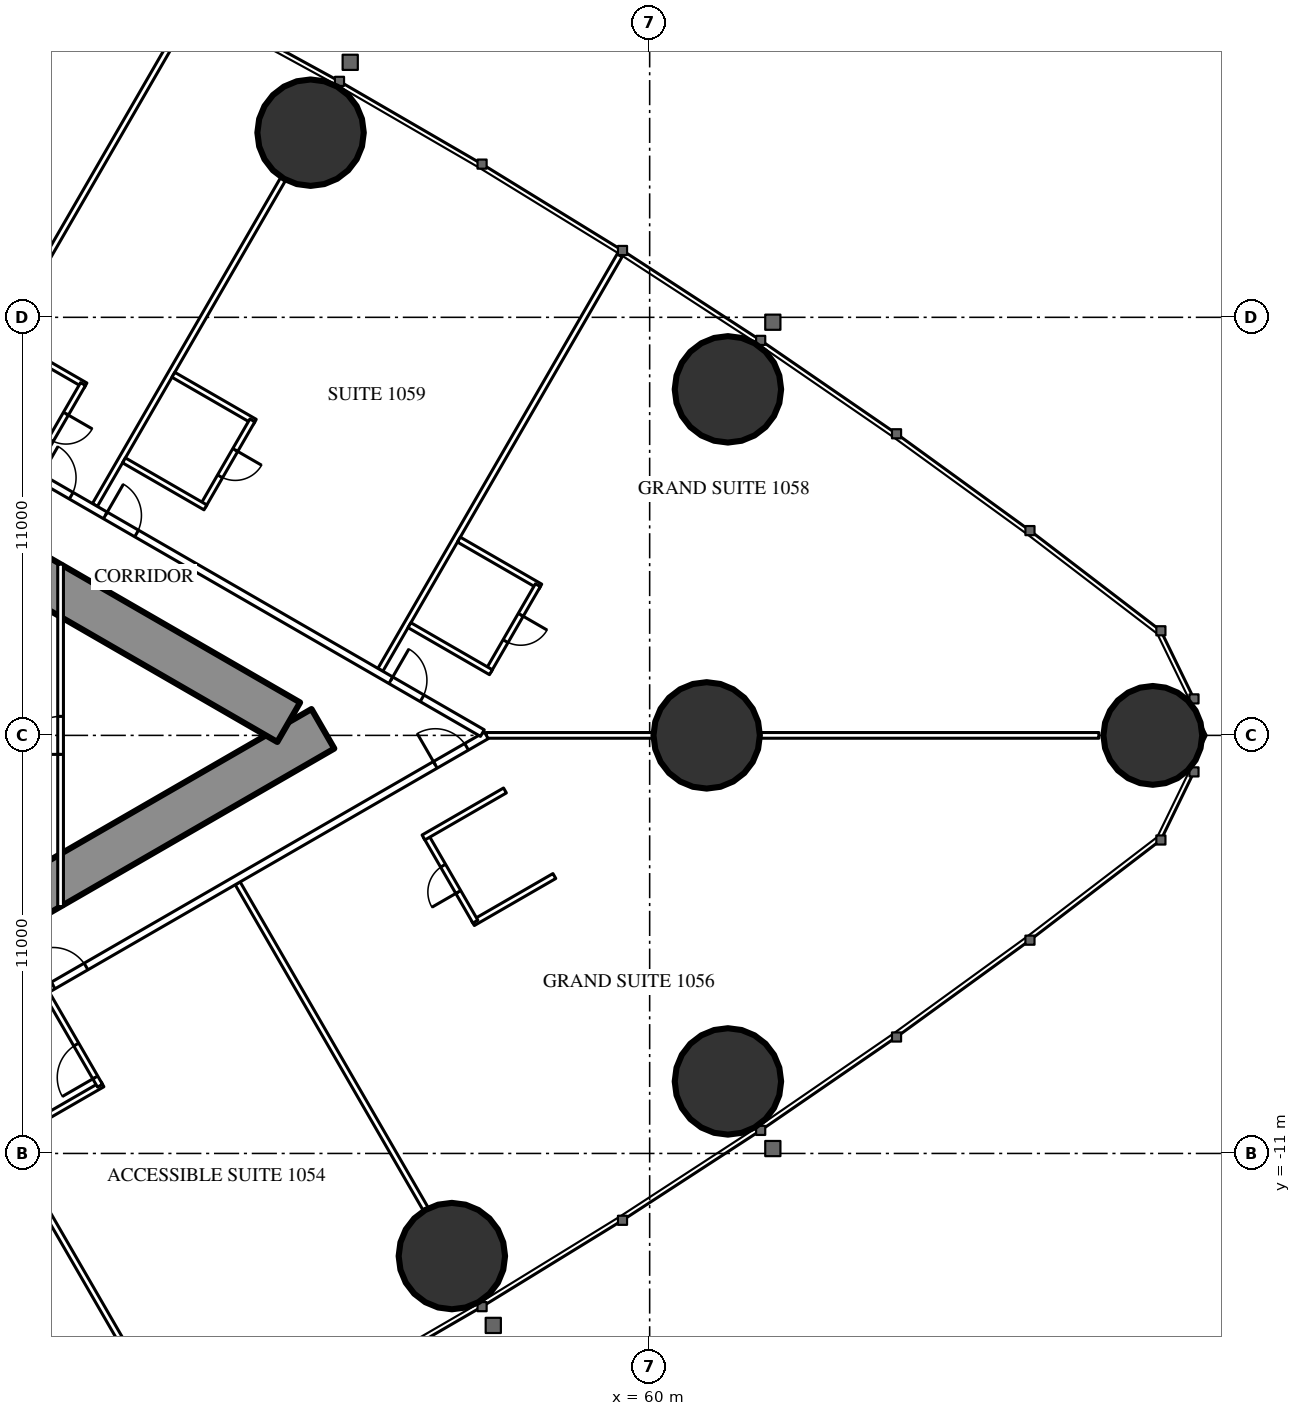
"""IFC4 building model, lengths in metres.
Left out: names, types, materials, properties, quantities, classifications, styles, units other than length and angle.
Written with IfcOpenShell. Run it as: python <this file> out.ifc"""

import sys

from ifc_helpers import new_model, si_unit, direction, frame, frame_2d, origin, origin_2d, place, context, subcontext, project, spatial, rectangle, hollow_circle, extrude, element, fill, save


model = new_model("IFC4")
c1 = context("Model", 3, precision=1e-05, world=origin(), true_north=direction((0.0, 1.0)))
c2 = subcontext(c1, "Body", "Model", "MODEL_VIEW")
j1 = project(units=[si_unit("LENGTHUNIT", "METRE"), si_unit("PLANEANGLEUNIT", "RADIAN")], contexts=[c1])
p1 = place(None, origin())
s1 = spatial("IfcSite", under=j1, at=p1, CompositionType="ELEMENT")
p2 = place(p1, origin())
s2 = spatial("IfcBuilding", under=s1, at=p2, CompositionType="ELEMENT")
p3 = place(p2, frame((0.0, 0.0, 42.5)))
s3 = spatial("IfcBuildingStorey", under=s2, at=p3, CompositionType="ELEMENT", Elevation=42.5)
p4 = place(p3, frame((73.239, 0.0, 0.0), z_axis=(0.0, 0.0, 1.0), x_axis=(1.0, 0.0, 0.0)))
e1 = element("IfcColumn", 1, at=p4, inside=s3, PredefinedType="COLUMN", context=c2, shape_type="SweptSolid", body=[
    extrude(hollow_circle(Radius=1.3, WallThickness=0.1, at=origin_2d()), origin(), (0.0, 0.0, 1.0), 3.5),
])
for number, where, z_axis, x_axis in (
    (2, (62.059, 9.105, 0.0), (0.0, 0.0, 1.0), (1.0, 0.0, 0.0)),
    (3, (51.078, 15.858, 0.0), (0.0, 0.0, 1.0), (1.0, 0.0, 0.0)),
    (4, (54.795, -13.701, 0.0), (0.0, 0.0, 1.0), (1.0, 0.0, 0.0)),
    (5, (62.059, -9.105, 0.0), (0.0, 0.0, 1.0), (1.0, 0.0, 0.0)),
):
    element("IfcColumn", number, at=place(p3, frame(where, z_axis=z_axis, x_axis=x_axis)), inside=s3, PredefinedType="COLUMN", context=c2, shape_type="SweptSolid", body=[
        extrude(hollow_circle(Radius=1.4, WallThickness=0.12, at=origin_2d()), origin(), (0.0, 0.0, 1.0), 3.5),
    ])
p5 = place(p3, frame((61.5, 0.0, 0.0), z_axis=(0.0, 0.0, 1.0), x_axis=(1.0, 0.0, 0.0)))
e6 = element("IfcColumn", 6, at=p5, inside=s3, PredefinedType="COLUMN", context=c2, shape_type="SweptSolid", body=[
    extrude(hollow_circle(Radius=1.4, WallThickness=0.1, at=origin_2d()), origin(), (0.0, 0.0, 1.0), 3.5),
])
p6 = place(p3, frame((27.2, -13.8, 0.0), z_axis=(0.0, 0.0, 1.0), x_axis=(0.866027159892, 0.499996958321, 0.0)))
e7 = element("IfcWall", 7, at=p6, inside=s3, PredefinedType="SHEAR", context=c2, shape_type="SweptSolid", body=[
    extrude(rectangle(XDim=27.947, YDim=1.2, at=frame_2d((13.973, 0.0))), origin(), (0.0, 0.0, 1.0), 3.5),
])
p7 = place(p6, frame((4.6, 0.0, 0.0)))
e8 = element("IfcOpeningElement", 8, at=p7, cuts=e7, PredefinedType="OPENING", context=c2, shape_type="SweptSolid", body=[
    extrude(rectangle(XDim=1.0, YDim=2.2, at=frame_2d((0.5, 1.1))), frame((0.0, 0.61, 0.0), z_axis=(0.0, -1.0, 0.0), x_axis=(1.0, 0.0, 0.0)), (0.0, 0.0, 1.0), 1.22),
])
p8 = place(p6, frame((13.395, 0.0, 0.0)))
e9 = element("IfcOpeningElement", 9, at=p8, cuts=e7, PredefinedType="OPENING", context=c2, shape_type="SweptSolid", body=[
    extrude(rectangle(XDim=1.8, YDim=2.2, at=frame_2d((0.9, 1.1))), frame((0.0, 0.61, 0.0), z_axis=(0.0, -1.0, 0.0), x_axis=(1.0, 0.0, 0.0)), (0.0, 0.0, 1.0), 1.22),
])
p9 = place(p3, frame((27.2, 13.8, 0.0), z_axis=(0.0, 0.0, 1.0), x_axis=(0.866024515034, -0.500001539357, 0.0)))
e10 = element("IfcWall", 10, at=p9, inside=s3, PredefinedType="SHEAR", context=c2, shape_type="SweptSolid", body=[
    extrude(rectangle(XDim=26.907, YDim=1.2, at=frame_2d((13.454, 0.0))), origin(), (0.0, 0.0, 1.0), 3.5),
])
p10 = place(p9, frame((4.6, 0.0, 0.0)))
e11 = element("IfcOpeningElement", 11, at=p10, cuts=e10, PredefinedType="OPENING", context=c2, shape_type="SweptSolid", body=[
    extrude(rectangle(XDim=1.0, YDim=2.2, at=frame_2d((0.5, 1.1))), frame((0.0, 0.61, 0.0), z_axis=(0.0, -1.0, 0.0), x_axis=(1.0, 0.0, 0.0)), (0.0, 0.0, 1.0), 1.22),
])
p11 = place(p9, frame((13.395, 0.0, 0.0)))
e12 = element("IfcOpeningElement", 12, at=p11, cuts=e10, PredefinedType="OPENING", context=c2, shape_type="SweptSolid", body=[
    extrude(rectangle(XDim=1.8, YDim=2.2, at=frame_2d((0.9, 1.1))), frame((0.0, 0.61, 0.0), z_axis=(0.0, -1.0, 0.0), x_axis=(1.0, 0.0, 0.0)), (0.0, 0.0, 1.0), 1.22),
])
p12 = place(p3, frame((41.647, -8.23, 0.0), z_axis=(0.0, 0.0, 1.0), x_axis=(0.49998590462, -0.866033541603, 0.0)))
e13 = element("IfcWall", 13, at=p12, inside=s3, PredefinedType="PARTITIONING", context=c2, shape_type="SweptSolid", body=[
    extrude(rectangle(XDim=12.621, YDim=0.15, at=frame_2d((6.311, 0.0))), origin(), (0.0, 0.0, 1.0), 3.25),
])
p13 = place(p3, frame((49.159, -3.893, 0.0), z_axis=(0.0, 0.0, 1.0), x_axis=(0.499998773722, -0.866026111775, 0.0)))
e14 = element("IfcWall", 14, at=p13, inside=s3, PredefinedType="PARTITIONING", context=c2, shape_type="SweptSolid", body=[
    extrude(rectangle(XDim=9.892, YDim=0.15, at=frame_2d((4.946, 0.0))), origin(), (0.0, 0.0, 1.0), 2.25),
])
p14 = place(p3, frame((41.647, 8.23, 0.0), z_axis=(0.0, 0.0, 1.0), x_axis=(0.49998590462, 0.866033541603, 0.0)))
e15 = element("IfcWall", 15, at=p14, inside=s3, PredefinedType="PARTITIONING", context=c2, shape_type="SweptSolid", body=[
    extrude(rectangle(XDim=12.621, YDim=0.15, at=frame_2d((6.311, 0.0))), origin(), (0.0, 0.0, 1.0), 3.25),
])
p15 = place(p3, frame((45.403, 6.062, 0.0), z_axis=(0.0, 0.0, 1.0), x_axis=(0.500013434677, 0.866017647131, 0.0)))
e16 = element("IfcWall", 16, at=p15, inside=s3, PredefinedType="PARTITIONING", context=c2, shape_type="SweptSolid", body=[
    extrude(rectangle(XDim=9.902, YDim=0.15, at=frame_2d((4.951, 0.0))), origin(), (0.0, 0.0, 1.0), 2.25),
])
p16 = place(p3, frame((52.915, 1.725, 0.0), z_axis=(0.0, 0.0, 1.0), x_axis=(0.499997163113, 0.866027041656, 0.0)))
e17 = element("IfcWall", 17, at=p16, inside=s3, PredefinedType="PARTITIONING", context=c2, shape_type="SweptSolid", body=[
    extrude(rectangle(XDim=12.591, YDim=0.15, at=frame_2d((6.295, 0.0))), origin(), (0.0, 0.0, 1.0), 3.25),
])
p17 = place(p3, frame((55.702, 0.0, 0.0), z_axis=(0.0, 0.0, 1.0), x_axis=(1.0, 0.0, 0.0)))
e18 = element("IfcWall", 18, at=p17, inside=s3, PredefinedType="PARTITIONING", context=c2, shape_type="SweptSolid", body=[
    extrude(rectangle(XDim=16.117, YDim=0.15, at=frame_2d((8.059, 0.0))), origin(), (0.0, 0.0, 1.0), 2.25),
])
p18 = place(p3, frame((37.96, -10.243, 0.0), z_axis=(0.0, 0.0, 1.0), x_axis=(0.866026429433, 0.499998223521, 0.0)))
e19 = element("IfcWall", 19, at=p18, inside=s3, PredefinedType="PARTITIONING", context=c2, shape_type="SweptSolid", body=[
    extrude(rectangle(XDim=20.487, YDim=0.2, at=frame_2d((10.243, 0.0))), origin(), (0.0, 0.0, 1.0), 3.25),
])
p19 = place(p18, frame((7.325, 0.0, 0.0)))
e20 = element("IfcOpeningElement", 20, at=p19, cuts=e19, PredefinedType="OPENING", context=c2, shape_type="SweptSolid", body=[
    extrude(rectangle(XDim=1.0, YDim=2.2, at=frame_2d((0.5, 1.1))), frame((0.0, 0.11, 0.0), z_axis=(0.0, -1.0, 0.0), x_axis=(1.0, 0.0, 0.0)), (0.0, 0.0, 1.0), 0.22),
])
p20 = place(p18, frame((18.937, 0.0, 0.0)))
e21 = element("IfcOpeningElement", 21, at=p20, cuts=e19, PredefinedType="OPENING", context=c2, shape_type="SweptSolid", body=[
    extrude(rectangle(XDim=0.95, YDim=2.2, at=frame_2d((0.475, 1.1))), frame((0.0, 0.11, 0.0), z_axis=(0.0, -1.0, 0.0), x_axis=(1.0, 0.0, 0.0)), (0.0, 0.0, 1.0), 0.22),
])
p21 = place(p18, frame((0.6, 0.0, 0.0)))
e22 = element("IfcOpeningElement", 22, at=p21, cuts=e19, PredefinedType="OPENING", context=c2, shape_type="SweptSolid", body=[
    extrude(rectangle(XDim=0.95, YDim=2.2, at=frame_2d((0.475, 1.1))), frame((0.0, 0.11, 0.0), z_axis=(0.0, -1.0, 0.0), x_axis=(1.0, 0.0, 0.0)), (0.0, 0.0, 1.0), 0.22),
])
p22 = place(p3, frame((36.834, 10.894, 0.0), z_axis=(0.0, 0.0, 1.0), x_axis=(0.866028157229, -0.499995230863, 0.0)))
e23 = element("IfcWall", 23, at=p22, inside=s3, PredefinedType="PARTITIONING", context=c2, shape_type="SweptSolid", body=[
    extrude(rectangle(XDim=21.667, YDim=0.2, at=frame_2d((10.833, 0.0))), origin(), (0.0, 0.0, 1.0), 3.25),
])
p23 = place(p22, frame((18.885, 0.0, 0.0)))
e24 = element("IfcOpeningElement", 24, at=p23, cuts=e23, PredefinedType="OPENING", context=c2, shape_type="SweptSolid", body=[
    extrude(rectangle(XDim=0.95, YDim=2.2, at=frame_2d((0.475, 1.1))), frame((0.0, 0.11, 0.0), z_axis=(0.0, -1.0, 0.0), x_axis=(1.0, 0.0, 0.0)), (0.0, 0.0, 1.0), 0.22),
])
p24 = place(p22, frame((10.212, 0.0, 0.0)))
e25 = element("IfcOpeningElement", 25, at=p24, cuts=e23, PredefinedType="OPENING", context=c2, shape_type="SweptSolid", body=[
    extrude(rectangle(XDim=0.95, YDim=2.2, at=frame_2d((0.475, 1.1))), frame((0.0, 0.11, 0.0), z_axis=(0.0, -1.0, 0.0), x_axis=(1.0, 0.0, 0.0)), (0.0, 0.0, 1.0), 0.22),
])
p25 = place(p22, frame((8.225, 0.0, 0.0)))
e26 = element("IfcOpeningElement", 26, at=p25, cuts=e23, PredefinedType="OPENING", context=c2, shape_type="SweptSolid", body=[
    extrude(rectangle(XDim=0.95, YDim=2.2, at=frame_2d((0.475, 1.1))), frame((0.0, 0.11, 0.0), z_axis=(0.0, -1.0, 0.0), x_axis=(1.0, 0.0, 0.0)), (0.0, 0.0, 1.0), 0.22),
])
p26 = place(p22, frame((1.825, 0.0, 0.0)))
e27 = element("IfcOpeningElement", 27, at=p26, cuts=e23, PredefinedType="OPENING", context=c2, shape_type="SweptSolid", body=[
    extrude(rectangle(XDim=0.95, YDim=2.2, at=frame_2d((0.475, 1.1))), frame((0.0, 0.11, 0.0), z_axis=(0.0, -1.0, 0.0), x_axis=(1.0, 0.0, 0.0)), (0.0, 0.0, 1.0), 0.22),
])
p27 = place(p22, frame((0.246, 0.0, 0.0)))
e28 = element("IfcOpeningElement", 28, at=p27, cuts=e23, PredefinedType="OPENING", context=c2, shape_type="SweptSolid", body=[
    extrude(rectangle(XDim=0.9, YDim=2.2, at=frame_2d((0.45, 1.1))), frame((0.0, 0.11, 0.0), z_axis=(0.0, -1.0, 0.0), x_axis=(1.0, 0.0, 0.0)), (0.0, 0.0, 1.0), 0.22),
])
p28 = place(p3, frame((43.112, -10.617, 0.0), z_axis=(0.0, 0.0, 1.0), x_axis=(0.866018712932, 0.500011588718, 0.0)))
e29 = element("IfcWall", 29, at=p28, inside=s3, PredefinedType="PARTITIONING", context=c2, shape_type="SweptSolid", body=[
    extrude(rectangle(XDim=2.875, YDim=0.15, at=frame_2d((1.438, 0.0))), origin(), (0.0, 0.0, 1.0), 3.25),
])
p29 = place(p3, frame((44.137, -6.792, 0.0), z_axis=(0.0, 0.0, 1.0), x_axis=(0.49994636267, -0.866056369097, 0.0)))
e30 = element("IfcWall", 30, at=p29, inside=s3, PredefinedType="PARTITIONING", context=c2, shape_type="SweptSolid", body=[
    extrude(rectangle(XDim=2.8, YDim=0.15, at=frame_2d((1.4, 0.0))), origin(), (0.0, 0.0, 1.0), 3.25),
])
p30 = place(p29, frame((1.55, 0.0, 0.0)))
e31 = element("IfcOpeningElement", 31, at=p30, cuts=e30, PredefinedType="OPENING", context=c2, shape_type="SweptSolid", body=[
    extrude(rectangle(XDim=1.0, YDim=2.2, at=frame_2d((0.5, 1.1))), frame((0.0, 0.085, 0.0), z_axis=(0.0, -1.0, 0.0), x_axis=(1.0, 0.0, 0.0)), (0.0, 0.0, 1.0), 0.17),
])
p31 = place(p3, frame((55.349, -4.938, 0.0), z_axis=(0.0, 0.0, 1.0), x_axis=(0.866006523861, 0.500032699561, 0.0)))
e32 = element("IfcWall", 32, at=p31, inside=s3, PredefinedType="PARTITIONING", context=c2, shape_type="SweptSolid", body=[
    extrude(rectangle(XDim=2.475, YDim=0.15, at=frame_2d((1.237, 0.0))), origin(), (0.0, 0.0, 1.0), 3.25),
])
p32 = place(p3, frame((54.114, -2.649, 0.0), z_axis=(0.0, 0.0, 1.0), x_axis=(0.500006934395, -0.866021400173, 0.0)))
e33 = element("IfcWall", 33, at=p32, inside=s3, PredefinedType="PARTITIONING", context=c2, shape_type="SweptSolid", body=[
    extrude(rectangle(XDim=2.6, YDim=0.15, at=frame_2d((1.3, 0.0))), origin(), (0.0, 0.0, 1.0), 3.25),
])
p33 = place(p32, frame((0.9, 0.0, 0.0)))
e34 = element("IfcOpeningElement", 34, at=p33, cuts=e33, PredefinedType="OPENING", context=c2, shape_type="SweptSolid", body=[
    extrude(rectangle(XDim=0.8, YDim=2.2, at=frame_2d((0.4, 1.1))), frame((0.0, 0.085, 0.0), z_axis=(0.0, -1.0, 0.0), x_axis=(1.0, 0.0, 0.0)), (0.0, 0.0, 1.0), 0.17),
])
for number, where, z_axis, x_axis in (
    (35, (54.049, -2.687, 0.0), (0.0, 0.0, 1.0), (0.866, 0.5, 0.0)),
    (36, (54.98, 5.151, 0.0), (0.0, 0.0, 1.0), (0.866, -0.5, 0.0)),
):
    element("IfcWall", number, at=place(p3, frame(where, z_axis=z_axis, x_axis=x_axis)), inside=s3, PredefinedType="PARTITIONING", context=c2, shape_type="SweptSolid", body=[
        extrude(rectangle(XDim=2.475, YDim=0.15, at=frame_2d((1.237, 0.0))), origin(), (0.0, 0.0, 1.0), 3.25),
    ])
p34 = place(p3, frame((55.758, 1.7, 0.0), z_axis=(0.0, 0.0, 1.0), x_axis=(0.500006934395, 0.866021400173, 0.0)))
e37 = element("IfcWall", 37, at=p34, inside=s3, PredefinedType="PARTITIONING", context=c2, shape_type="SweptSolid", body=[
    extrude(rectangle(XDim=2.6, YDim=0.15, at=frame_2d((1.3, 0.0))), origin(), (0.0, 0.0, 1.0), 3.25),
])
p35 = place(p34, frame((0.9, 0.0, 0.0)))
e38 = element("IfcOpeningElement", 38, at=p35, cuts=e37, PredefinedType="OPENING", context=c2, shape_type="SweptSolid", body=[
    extrude(rectangle(XDim=0.8, YDim=2.2, at=frame_2d((0.4, 1.1))), frame((0.0, 0.085, 0.0), z_axis=(0.0, -1.0, 0.0), x_axis=(1.0, 0.0, 0.0)), (0.0, 0.0, 1.0), 0.17),
])
for number, where, z_axis, x_axis in (
    (39, (53.68, 2.9, 0.0), (0.0, 0.0, 1.0), (0.866, -0.5, 0.0)),
    (40, (47.468, 9.488, 0.0), (0.0, 0.0, 1.0), (0.866, -0.5, 0.0)),
):
    element("IfcWall", number, at=place(p3, frame(where, z_axis=z_axis, x_axis=x_axis)), inside=s3, PredefinedType="PARTITIONING", context=c2, shape_type="SweptSolid", body=[
        extrude(rectangle(XDim=2.475, YDim=0.15, at=frame_2d((1.237, 0.0))), origin(), (0.0, 0.0, 1.0), 3.25),
    ])
p36 = place(p3, frame((48.246, 6.037, 0.0), z_axis=(0.0, 0.0, 1.0), x_axis=(0.500006934395, 0.866021400173, 0.0)))
e41 = element("IfcWall", 41, at=p36, inside=s3, PredefinedType="PARTITIONING", context=c2, shape_type="SweptSolid", body=[
    extrude(rectangle(XDim=2.6, YDim=0.15, at=frame_2d((1.3, 0.0))), origin(), (0.0, 0.0, 1.0), 3.25),
])
p37 = place(p36, frame((0.9, 0.0, 0.0)))
e42 = element("IfcOpeningElement", 42, at=p37, cuts=e41, PredefinedType="OPENING", context=c2, shape_type="SweptSolid", body=[
    extrude(rectangle(XDim=0.8, YDim=2.2, at=frame_2d((0.4, 1.1))), frame((0.0, 0.085, 0.0), z_axis=(0.0, -1.0, 0.0), x_axis=(1.0, 0.0, 0.0)), (0.0, 0.0, 1.0), 0.17),
])
p38 = place(p3, frame((46.168, 7.237, 0.0), z_axis=(0.0, 0.0, 1.0), x_axis=(0.866006523861, -0.500032699561, 0.0)))
e43 = element("IfcWall", 43, at=p38, inside=s3, PredefinedType="PARTITIONING", context=c2, shape_type="SweptSolid", body=[
    extrude(rectangle(XDim=2.475, YDim=0.15, at=frame_2d((1.237, 0.0))), origin(), (0.0, 0.0, 1.0), 3.25),
])
p39 = place(p3, frame((43.012, 10.444, 0.0), z_axis=(0.0, 0.0, 1.0), x_axis=(0.866031185235, -0.4999899861, 0.0)))
e44 = element("IfcWall", 44, at=p39, inside=s3, PredefinedType="PARTITIONING", context=c2, shape_type="SweptSolid", body=[
    extrude(rectangle(XDim=2.475, YDim=0.15, at=frame_2d((1.238, 0.0))), origin(), (0.0, 0.0, 1.0), 3.25),
])
p40 = place(p3, frame((43.791, 6.993, 0.0), z_axis=(0.0, 0.0, 1.0), x_axis=(0.500047596559, 0.865997922154, 0.0)))
e45 = element("IfcWall", 45, at=p40, inside=s3, PredefinedType="PARTITIONING", context=c2, shape_type="SweptSolid", body=[
    extrude(rectangle(XDim=2.6, YDim=0.15, at=frame_2d((1.3, 0.0))), origin(), (0.0, 0.0, 1.0), 3.25),
])
p41 = place(p40, frame((0.9, 0.0, 0.0)))
e46 = element("IfcOpeningElement", 46, at=p41, cuts=e45, PredefinedType="OPENING", context=c2, shape_type="SweptSolid", body=[
    extrude(rectangle(XDim=0.8, YDim=2.2, at=frame_2d((0.4, 1.1))), frame((0.0, 0.085, 0.0), z_axis=(0.0, -1.0, 0.0), x_axis=(1.0, 0.0, 0.0)), (0.0, 0.0, 1.0), 0.17),
])
p42 = place(p3, frame((44.5, -4.505, 0.0), z_axis=(0.0, 0.0, 1.0), x_axis=(0.0, 1.0, 0.0)))
e47 = element("IfcWall", 47, at=p42, inside=s3, PredefinedType="PARTITIONING", context=c2, shape_type="SweptSolid", body=[
    extrude(rectangle(XDim=9.009, YDim=0.15, at=frame_2d((4.505, 0.0))), origin(), (0.0, 0.0, 1.0), 2.45),
])
p43 = place(p42, frame((4.005, 0.0, 0.0)))
e48 = element("IfcOpeningElement", 48, at=p43, cuts=e47, PredefinedType="OPENING", context=c2, shape_type="SweptSolid", body=[
    extrude(rectangle(XDim=1.0, YDim=2.2, at=frame_2d((0.5, 1.1))), frame((0.0, 0.085, 0.0), z_axis=(0.0, -1.0, 0.0), x_axis=(1.0, 0.0, 0.0)), (0.0, 0.0, 1.0), 0.17),
])
p44 = place(p30, origin())
e49 = element("IfcDoor", 49, at=p44, inside=s3, OperationType="SINGLE_SWING_RIGHT", PredefinedType="DOOR", context=c2, shape_type="SweptSolid", body=[
    extrude(rectangle(XDim=1.0, YDim=2.2, at=frame_2d((0.5, 1.1))), frame((0.0, 0.025, 0.0), z_axis=(0.0, -1.0, 0.0), x_axis=(1.0, 0.0, 0.0)), (0.0, 0.0, 1.0), 0.05),
])
fill(e31, e49)
p45 = place(p19, origin())
e50 = element("IfcDoor", 50, at=p45, inside=s3, OperationType="SINGLE_SWING_LEFT", PredefinedType="DOOR", context=c2, shape_type="SweptSolid", body=[
    extrude(rectangle(XDim=1.0, YDim=2.2, at=frame_2d((0.5, 1.1))), frame((0.0, 0.025, 0.0), z_axis=(0.0, -1.0, 0.0), x_axis=(1.0, 0.0, 0.0)), (0.0, 0.0, 1.0), 0.05),
])
fill(e20, e50)
p46 = place(p33, origin())
e51 = element("IfcDoor", 51, at=p46, inside=s3, OperationType="SINGLE_SWING_RIGHT", PredefinedType="DOOR", context=c2, shape_type="SweptSolid", body=[
    extrude(rectangle(XDim=0.8, YDim=2.2, at=frame_2d((0.4, 1.1))), frame((0.0, 0.025, 0.0), z_axis=(0.0, -1.0, 0.0), x_axis=(1.0, 0.0, 0.0)), (0.0, 0.0, 1.0), 0.05),
])
fill(e34, e51)
p47 = place(p20, origin())
e52 = element("IfcDoor", 52, at=p47, inside=s3, OperationType="SINGLE_SWING_LEFT", PredefinedType="DOOR", context=c2, shape_type="SweptSolid", body=[
    extrude(rectangle(XDim=0.95, YDim=2.2, at=frame_2d((0.475, 1.1))), frame((0.0, 0.025, 0.0), z_axis=(0.0, -1.0, 0.0), x_axis=(1.0, 0.0, 0.0)), (0.0, 0.0, 1.0), 0.05),
])
fill(e21, e52)
p48 = place(p35, origin())
e53 = element("IfcDoor", 53, at=p48, inside=s3, OperationType="SINGLE_SWING_RIGHT", PredefinedType="DOOR", context=c2, shape_type="SweptSolid", body=[
    extrude(rectangle(XDim=0.8, YDim=2.2, at=frame_2d((0.4, 1.1))), frame((0.0, 0.025, 0.0), z_axis=(0.0, -1.0, 0.0), x_axis=(1.0, 0.0, 0.0)), (0.0, 0.0, 1.0), 0.05),
])
fill(e38, e53)
p49 = place(p23, origin())
e54 = element("IfcDoor", 54, at=p49, inside=s3, OperationType="SINGLE_SWING_LEFT", PredefinedType="DOOR", context=c2, shape_type="SweptSolid", body=[
    extrude(rectangle(XDim=0.95, YDim=2.2, at=frame_2d((0.475, 1.1))), frame((0.0, 0.025, 0.0), z_axis=(0.0, -1.0, 0.0), x_axis=(1.0, 0.0, 0.0)), (0.0, 0.0, 1.0), 0.05),
])
fill(e24, e54)
p50 = place(p37, origin())
e55 = element("IfcDoor", 55, at=p50, inside=s3, OperationType="SINGLE_SWING_RIGHT", PredefinedType="DOOR", context=c2, shape_type="SweptSolid", body=[
    extrude(rectangle(XDim=0.8, YDim=2.2, at=frame_2d((0.4, 1.1))), frame((0.0, 0.025, 0.0), z_axis=(0.0, -1.0, 0.0), x_axis=(1.0, 0.0, 0.0)), (0.0, 0.0, 1.0), 0.05),
])
fill(e42, e55)
p51 = place(p24, origin())
e56 = element("IfcDoor", 56, at=p51, inside=s3, OperationType="SINGLE_SWING_LEFT", PredefinedType="DOOR", context=c2, shape_type="SweptSolid", body=[
    extrude(rectangle(XDim=0.95, YDim=2.2, at=frame_2d((0.475, 1.1))), frame((0.0, 0.025, 0.0), z_axis=(0.0, -1.0, 0.0), x_axis=(1.0, 0.0, 0.0)), (0.0, 0.0, 1.0), 0.05),
])
fill(e25, e56)
p52 = place(p41, origin())
e57 = element("IfcDoor", 57, at=p52, inside=s3, OperationType="SINGLE_SWING_RIGHT", PredefinedType="DOOR", context=c2, shape_type="SweptSolid", body=[
    extrude(rectangle(XDim=0.8, YDim=2.2, at=frame_2d((0.4, 1.1))), frame((0.0, 0.025, 0.0), z_axis=(0.0, -1.0, 0.0), x_axis=(1.0, 0.0, 0.0)), (0.0, 0.0, 1.0), 0.05),
])
fill(e46, e57)
p53 = place(p25, origin())
e58 = element("IfcDoor", 58, at=p53, inside=s3, OperationType="SINGLE_SWING_LEFT", PredefinedType="DOOR", context=c2, shape_type="SweptSolid", body=[
    extrude(rectangle(XDim=0.95, YDim=2.2, at=frame_2d((0.475, 1.1))), frame((0.0, 0.025, 0.0), z_axis=(0.0, -1.0, 0.0), x_axis=(1.0, 0.0, 0.0)), (0.0, 0.0, 1.0), 0.05),
])
fill(e26, e58)
p54 = place(p43, origin())
e59 = element("IfcDoor", 59, at=p54, inside=s3, OperationType="SINGLE_SWING_LEFT", PredefinedType="DOOR", context=c2, shape_type="SweptSolid", body=[
    extrude(rectangle(XDim=1.0, YDim=2.2, at=frame_2d((0.5, 1.1))), frame((0.0, 0.025, 0.0), z_axis=(0.0, -1.0, 0.0), x_axis=(1.0, 0.0, 0.0)), (0.0, 0.0, 1.0), 0.05),
])
fill(e48, e59)
save(model, sys.argv[1])
